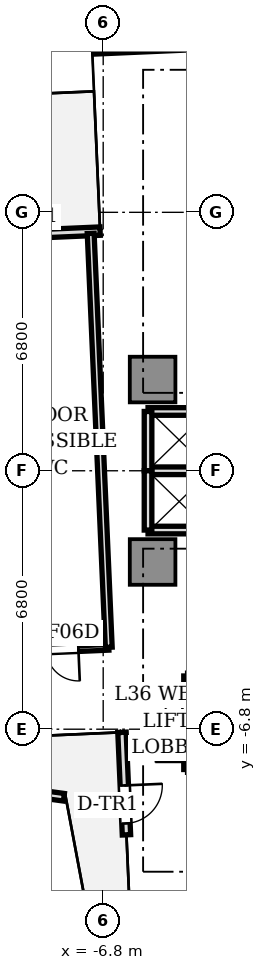
"""IFC4 building model, lengths in metres.
Left out: names, types, materials, properties, quantities, classifications, styles, units other than length and angle.
Written with IfcOpenShell. Run it as: python <this file> out.ifc"""

import sys

from ifc_helpers import new_model, si_unit, direction, frame, frame_2d, origin, origin_2d, place, context, subcontext, project, spatial, rectangle, extrude, source, transform, mapped, element, fill, save


model = new_model("IFC4")
c1 = context("Model", 3, precision=1e-05, world=origin(), true_north=direction((0.0, 1.0)))
c2 = subcontext(c1, "Body", "Model", "MODEL_VIEW")
j1 = project(units=[si_unit("LENGTHUNIT", "METRE"), si_unit("PLANEANGLEUNIT", "RADIAN")], contexts=[c1])
p1 = place(None, origin())
s1 = spatial("IfcSite", under=j1, at=p1, CompositionType="ELEMENT")
p2 = place(p1, origin())
s2 = spatial("IfcBuilding", under=s1, at=p2, CompositionType="ELEMENT")
p3 = place(p2, frame((0.0, 0.0, 131.55)))
s3 = spatial("IfcBuildingStorey", under=s2, at=p3, CompositionType="ELEMENT", Elevation=131.55)
m1 = source(origin(), c2, "Body", "SweptSolid", [
    extrude(rectangle(XDim=1.2, YDim=1.2, at=origin_2d()), origin(), (0.0, 0.0, 1.0), 3.11),
])
for number, where, z_axis, x_axis in (
    (1, (-5.5, 2.4, 0.0), (0.0, 0.0, 1.0), (1.0, 0.0, 0.0)),
    (2, (-5.5, -2.4, 0.0), (0.0, 0.0, 1.0), (1.0, 0.0, 0.0)),
):
    element("IfcColumn", number, at=place(p3, frame(where, z_axis=z_axis, x_axis=x_axis)), inside=s3, PredefinedType="COLUMN", context=c2, shape_type="MappedRepresentation", body=[
        mapped(m1, transform((0.0, 0.0, 0.0), scale=1.0)),
    ])
p4 = place(p3, frame((-6.882, 6.306, 0.0), z_axis=(0.0, 0.0, 1.0), x_axis=(-0.999045894436, -0.043672655174, 0.0)))
e3 = element("IfcWall", 3, at=p4, inside=s3, PredefinedType="STANDARD", context=c2, shape_type="SweptSolid", body=[
    extrude(rectangle(XDim=2.7, YDim=0.22, at=frame_2d((1.35, 0.0))), origin(), (0.0, 0.0, 1.0), 3.11),
])
p5 = place(p4, frame((1.4, 0.0, 0.0)))
e4 = element("IfcOpeningElement", 4, at=p5, cuts=e3, PredefinedType="OPENING", context=c2, shape_type="SweptSolid", body=[
    extrude(rectangle(XDim=1.0, YDim=2.2, at=frame_2d((0.5, 1.1))), frame((0.0, 0.12, 0.0), z_axis=(0.0, -1.0, 0.0), x_axis=(1.0, 0.0, 0.0)), (0.0, 0.0, 1.0), 0.24),
])
p6 = place(p3, frame((-6.306, -6.882, 0.0), z_axis=(0.0, 0.0, 1.0), x_axis=(0.043672655174, -0.999045894436, 0.0)))
e5 = element("IfcWall", 5, at=p6, inside=s3, PredefinedType="STANDARD", context=c2, shape_type="SweptSolid", body=[
    extrude(rectangle(XDim=2.7, YDim=0.22, at=frame_2d((1.35, 0.0))), origin(), (0.0, 0.0, 1.0), 3.11),
])
p7 = place(p6, frame((1.4, 0.0, 0.0)))
e6 = element("IfcOpeningElement", 6, at=p7, cuts=e5, PredefinedType="OPENING", context=c2, shape_type="SweptSolid", body=[
    extrude(rectangle(XDim=1.0, YDim=2.2, at=frame_2d((0.5, 1.1))), frame((0.0, 0.12, 0.0), z_axis=(0.0, -1.0, 0.0), x_axis=(1.0, 0.0, 0.0)), (0.0, 0.0, 1.0), 0.24),
])
p8 = place(p3, frame((-9.823, -8.318, 0.0), z_axis=(0.0, 0.0, 1.0), x_axis=(0.990724749974, -0.135884030663, 0.0)))
e7 = element("IfcWall", 7, at=p8, inside=s3, PredefinedType="PARAPET", context=c2, shape_type="SweptSolid", body=[
    extrude(rectangle(XDim=2.007, YDim=0.2, at=frame_2d((1.003, 0.0))), origin(), (0.0, 0.0, 1.0), 0.65),
])
for number, where, z_axis, x_axis in (
    (8, (-5.62, 1.56, 0.0), (0.0, 0.0, 1.0), (1.0, 0.0, 0.0)),
    (9, (-5.62, -1.56, 0.0), (0.0, 0.0, 1.0), (1.0, 0.0, 0.0)),
    (10, (-5.62, 0.0, 0.0), (0.0, 0.0, 1.0), (1.0, 0.0, 0.0)),
):
    element("IfcWall", number, at=place(p3, frame(where, z_axis=z_axis, x_axis=x_axis)), inside=s3, PredefinedType="SOLIDWALL", context=c2, shape_type="SweptSolid", body=[
        extrude(rectangle(XDim=1.64, YDim=0.2, at=frame_2d((0.82, 0.0))), origin(), (0.0, 0.0, 1.0), 2.66),
    ])
for number, where, z_axis, x_axis in (
    (11, (-5.62, 0.0, 0.0), (0.0, 0.0, 1.0), (0.0, 1.0, 0.0)),
    (12, (-5.62, -1.56, 0.0), (0.0, 0.0, 1.0), (0.0, 1.0, 0.0)),
):
    element("IfcWall", number, at=place(p3, frame(where, z_axis=z_axis, x_axis=x_axis)), inside=s3, PredefinedType="SOLIDWALL", context=c2, shape_type="SweptSolid", body=[
        extrude(rectangle(XDim=1.56, YDim=0.2, at=frame_2d((0.78, 0.0))), origin(), (0.0, 0.0, 1.0), 2.66),
    ])
p9 = place(p3, frame((-4.58, -7.86, 0.0), z_axis=(0.0, 0.0, 1.0), x_axis=(0.0, 1.0, 0.0)))
e13 = element("IfcWall", 13, at=p9, inside=s3, PredefinedType="SOLIDWALL", context=c2, shape_type="SweptSolid", body=[
    extrude(rectangle(XDim=2.46, YDim=0.2, at=frame_2d((1.23, 0.0))), origin(), (0.0, 0.0, 1.0), 2.66),
])
p10 = place(p9, frame((0.2, 0.0, 0.0)))
e14 = element("IfcOpeningElement", 14, at=p10, cuts=e13, PredefinedType="OPENING", context=c2, shape_type="SweptSolid", body=[
    extrude(rectangle(XDim=0.85, YDim=2.1, at=frame_2d((0.425, 1.05))), frame((0.0, 0.11, 0.0), z_axis=(0.0, -1.0, 0.0), x_axis=(1.0, 0.0, 0.0)), (0.0, 0.0, 1.0), 0.22),
])
p11 = place(p9, frame((1.38, 0.0, 0.0)))
e15 = element("IfcOpeningElement", 15, at=p11, cuts=e13, PredefinedType="OPENING", context=c2, shape_type="SweptSolid", body=[
    extrude(rectangle(XDim=0.85, YDim=2.1, at=frame_2d((0.425, 1.05))), frame((0.0, 0.11, 0.0), z_axis=(0.0, -1.0, 0.0), x_axis=(1.0, 0.0, 0.0)), (0.0, 0.0, 1.0), 0.22),
])
p12 = place(p3, frame((-3.542, 11.206, 0.0), z_axis=(0.0, 0.0, 1.0), x_axis=(-0.999046129111, -0.04366728647, 0.0)))
e16 = element("IfcWall", 16, at=p12, inside=s3, PredefinedType="PARTITIONING", context=c2, shape_type="SweptSolid", body=[
    extrude(rectangle(XDim=3.5, YDim=0.18, at=frame_2d((1.75, 0.0))), origin(), (0.0, 0.0, 1.0), 2.66),
])
p13 = place(p3, frame((-6.654, -4.645, 0.0), z_axis=(0.0, 0.0, 1.0), x_axis=(-0.999048925025, -0.043603272887, 0.0)))
e17 = element("IfcWall", 17, at=p13, inside=s3, PredefinedType="PARTITIONING", context=c2, shape_type="SweptSolid", body=[
    extrude(rectangle(XDim=8.55, YDim=0.15, at=frame_2d((4.275, 0.0))), origin(), (0.0, 0.0, 1.0), 2.63),
])
p14 = place(p13, frame((0.8, 0.0, 0.0)))
e18 = element("IfcOpeningElement", 18, at=p14, cuts=e17, PredefinedType="OPENING", context=c2, shape_type="SweptSolid", body=[
    extrude(rectangle(XDim=0.85, YDim=2.1, at=frame_2d((0.425, 1.05))), frame((0.0, 0.085, 0.0), z_axis=(0.0, -1.0, 0.0), x_axis=(1.0, 0.0, 0.0)), (0.0, 0.0, 1.0), 0.17),
])
p15 = place(p13, frame((4.1, 0.0, 0.0)))
e19 = element("IfcOpeningElement", 19, at=p15, cuts=e17, PredefinedType="OPENING", context=c2, shape_type="SweptSolid", body=[
    extrude(rectangle(XDim=0.85, YDim=2.1, at=frame_2d((0.425, 1.05))), frame((0.0, 0.085, 0.0), z_axis=(0.0, -1.0, 0.0), x_axis=(1.0, 0.0, 0.0)), (0.0, 0.0, 1.0), 0.17),
])
p16 = place(p3, frame((-7.129, 6.245, 0.0), z_axis=(0.0, 0.0, 1.0), x_axis=(0.043608291235, -0.999048705988, 0.0)))
e20 = element("IfcWall", 20, at=p16, inside=s3, PredefinedType="PARTITIONING", context=c2, shape_type="SweptSolid", body=[
    extrude(rectangle(XDim=10.9, YDim=0.18, at=frame_2d((5.45, 0.0))), origin(), (0.0, 0.0, 1.0), 2.66),
])
p17 = place(p3, frame((-6.049, -11.625, 0.0), z_axis=(0.0, 0.0, 1.0), x_axis=(0.999047806124, 0.043628901879, 0.0)))
e21 = element("IfcWall", 21, at=p17, inside=s3, PredefinedType="PARTITIONING", context=c2, shape_type="SweptSolid", body=[
    extrude(rectangle(XDim=13.1, YDim=0.15, at=frame_2d((6.55, 0.0))), origin(), (0.0, 0.0, 1.0), 2.66),
])
p18 = place(p17, frame((5.75, 0.0, 0.0)))
e22 = element("IfcOpeningElement", 22, at=p18, cuts=e21, PredefinedType="OPENING", context=c2, shape_type="SweptSolid", body=[
    extrude(rectangle(XDim=1.6, YDim=2.25, at=frame_2d((0.8, 1.125))), frame((0.0, 0.085, 0.0), z_axis=(0.0, -1.0, 0.0), x_axis=(1.0, 0.0, 0.0)), (0.0, 0.0, 1.0), 0.17),
])
m2 = source(origin(), c2, "Body", "SweptSolid", [
    extrude(rectangle(XDim=1.0, YDim=0.05, at=origin_2d()), origin(), (0.0, 0.0, 1.0), 2.2),
])
p19 = place(p7, frame((0.5, 0.0, 0.0)))
e23 = element("IfcDoor", 23, at=p19, inside=s3, OperationType="SINGLE_SWING_LEFT", PredefinedType="DOOR", context=c2, shape_type="MappedRepresentation", body=[
    mapped(m2, transform((0.0, 0.0, 0.0), scale=1.0)),
])
fill(e6, e23)
m3 = source(origin(), c2, "Body", "SweptSolid", [
    extrude(rectangle(XDim=0.85, YDim=0.05, at=origin_2d()), origin(), (0.0, 0.0, 1.0), 2.1),
])
p20 = place(p14, frame((0.425, 0.0, 0.0)))
e24 = element("IfcDoor", 24, at=p20, inside=s3, OperationType="SINGLE_SWING_LEFT", PredefinedType="DOOR", context=c2, shape_type="MappedRepresentation", body=[
    mapped(m3, transform((0.0, 0.0, 0.0), scale=1.0)),
])
fill(e18, e24)
save(model, sys.argv[1])
